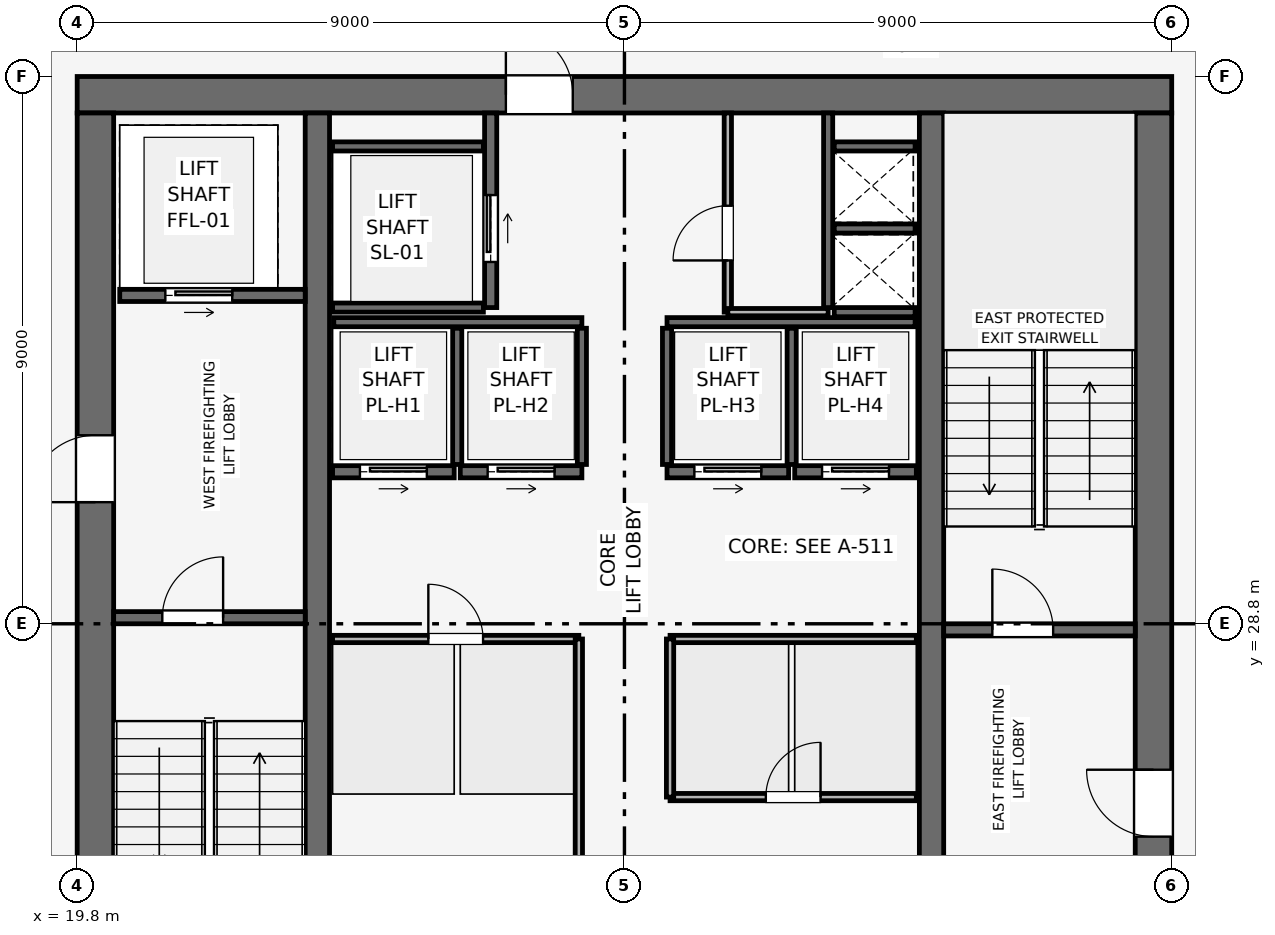
"""IFC4 building model, lengths in metres.
Left out: names, types, materials, properties, quantities, classifications, styles, units other than length and angle.
Written with IfcOpenShell. Run it as: python <this file> out.ifc"""

import sys

from ifc_helpers import new_model, si_unit, direction, frame, frame_2d, origin, place, context, subcontext, project, spatial, rectangle, extrude, element, fill, save


model = new_model("IFC4")
c1 = context("Model", 3, precision=1e-05, world=origin(), true_north=direction((0.0, 1.0)))
c2 = subcontext(c1, "Body", "Model", "MODEL_VIEW")
j1 = project(units=[si_unit("LENGTHUNIT", "METRE"), si_unit("PLANEANGLEUNIT", "RADIAN")], contexts=[c1])
p1 = place(None, origin())
s1 = spatial("IfcSite", under=j1, at=p1, CompositionType="ELEMENT")
p2 = place(p1, origin())
s2 = spatial("IfcBuilding", under=s1, at=p2, CompositionType="ELEMENT")
p3 = place(p2, frame((0.0, 0.0, 303.0)))
s3 = spatial("IfcBuildingStorey", under=s2, at=p3, CompositionType="ELEMENT", Elevation=303.0)
p4 = place(p3, frame((19.8, 37.5, 0.0), z_axis=(0.0, 0.0, 1.0), x_axis=(1.0, 0.0, 0.0)))
e1 = element("IfcWall", 1, at=p4, inside=s3, PredefinedType="SHEAR", context=c2, shape_type="SweptSolid", body=[
    extrude(rectangle(XDim=18.0, YDim=0.6, at=frame_2d((9.0, 0.0))), origin(), (0.0, 0.0, 1.0), 3.75),
])
p5 = place(p4, frame((7.05, 0.0, 0.0)))
e2 = element("IfcOpeningElement", 2, at=p5, cuts=e1, PredefinedType="OPENING", context=c2, shape_type="SweptSolid", body=[
    extrude(rectangle(XDim=1.1, YDim=2.15, at=frame_2d((0.55, 1.075))), frame((0.0, 0.31, 0.0), z_axis=(0.0, -1.0, 0.0), x_axis=(1.0, 0.0, 0.0)), (0.0, 0.0, 1.0), 0.62),
])
p6 = place(p3, frame((20.1, 20.4, 0.0), z_axis=(0.0, 0.0, 1.0), x_axis=(0.0, 1.0, 0.0)))
e3 = element("IfcWall", 3, at=p6, inside=s3, PredefinedType="SHEAR", context=c2, shape_type="SweptSolid", body=[
    extrude(rectangle(XDim=16.8, YDim=0.6, at=frame_2d((8.4, 0.0))), origin(), (0.0, 0.0, 1.0), 3.75),
])
p7 = place(p6, frame((10.4, 0.0, 0.0)))
e4 = element("IfcOpeningElement", 4, at=p7, cuts=e3, PredefinedType="OPENING", context=c2, shape_type="SweptSolid", body=[
    extrude(rectangle(XDim=1.1, YDim=2.15, at=frame_2d((0.55, 1.075))), frame((0.0, 0.31, 0.0), z_axis=(0.0, -1.0, 0.0), x_axis=(1.0, 0.0, 0.0)), (0.0, 0.0, 1.0), 0.62),
])
p8 = place(p3, frame((37.5, 20.4, 0.0), z_axis=(0.0, 0.0, 1.0), x_axis=(0.0, 1.0, 0.0)))
e5 = element("IfcWall", 5, at=p8, inside=s3, PredefinedType="SHEAR", context=c2, shape_type="SweptSolid", body=[
    extrude(rectangle(XDim=16.8, YDim=0.6, at=frame_2d((8.4, 0.0))), origin(), (0.0, 0.0, 1.0), 3.75),
])
p9 = place(p8, frame((4.9, 0.0, 0.0)))
e6 = element("IfcOpeningElement", 6, at=p9, cuts=e5, PredefinedType="OPENING", context=c2, shape_type="SweptSolid", body=[
    extrude(rectangle(XDim=1.1, YDim=2.15, at=frame_2d((0.55, 1.075))), frame((0.0, 0.31, 0.0), z_axis=(0.0, -1.0, 0.0), x_axis=(1.0, 0.0, 0.0)), (0.0, 0.0, 1.0), 0.62),
])
for number, where, z_axis, x_axis in (
    (7, (23.75, 20.4, 0.0), (0.0, 0.0, 1.0), (0.0, 1.0, 0.0)),
    (8, (33.85, 20.4, 0.0), (0.0, 0.0, 1.0), (0.0, 1.0, 0.0)),
):
    element("IfcWall", number, at=place(p3, frame(where, z_axis=z_axis, x_axis=x_axis)), inside=s3, PredefinedType="SHEAR", context=c2, shape_type="SweptSolid", body=[
        extrude(rectangle(XDim=16.8, YDim=0.4, at=frame_2d((8.4, 0.0))), origin(), (0.0, 0.0, 1.0), 3.75),
    ])
p10 = place(p3, frame((20.4, 28.9, 0.0), z_axis=(0.0, 0.0, 1.0), x_axis=(1.0, 0.0, 0.0)))
e9 = element("IfcWall", 9, at=p10, inside=s3, PredefinedType="SHEAR", context=c2, shape_type="SweptSolid", body=[
    extrude(rectangle(XDim=3.15, YDim=0.2, at=frame_2d((1.575, 0.0))), origin(), (0.0, 0.0, 1.0), 3.51),
])
p11 = place(p10, frame((0.8, 0.0, 0.0)))
e10 = element("IfcOpeningElement", 10, at=p11, cuts=e9, PredefinedType="OPENING", context=c2, shape_type="SweptSolid", body=[
    extrude(rectangle(XDim=1.0, YDim=2.1, at=frame_2d((0.5, 1.05))), frame((0.0, 0.11, 0.0), z_axis=(0.0, -1.0, 0.0), x_axis=(1.0, 0.0, 0.0)), (0.0, 0.0, 1.0), 0.22),
])
p12 = place(p3, frame((34.05, 28.7, 0.0), z_axis=(0.0, 0.0, 1.0), x_axis=(1.0, 0.0, 0.0)))
e11 = element("IfcWall", 11, at=p12, inside=s3, PredefinedType="SHEAR", context=c2, shape_type="SweptSolid", body=[
    extrude(rectangle(XDim=3.15, YDim=0.2, at=frame_2d((1.575, 0.0))), origin(), (0.0, 0.0, 1.0), 3.51),
])
p13 = place(p12, frame((0.8, 0.0, 0.0)))
e12 = element("IfcOpeningElement", 12, at=p13, cuts=e11, PredefinedType="OPENING", context=c2, shape_type="SweptSolid", body=[
    extrude(rectangle(XDim=1.0, YDim=2.1, at=frame_2d((0.5, 1.05))), frame((0.0, 0.11, 0.0), z_axis=(0.0, -1.0, 0.0), x_axis=(1.0, 0.0, 0.0)), (0.0, 0.0, 1.0), 0.22),
])
p14 = place(p3, frame((32.15, 34.0, 0.0), z_axis=(0.0, 0.0, 1.0), x_axis=(0.0, 1.0, 0.0)))
e13 = element("IfcWall", 13, at=p14, inside=s3, PredefinedType="SHEAR", context=c2, shape_type="SweptSolid", body=[
    extrude(rectangle(XDim=3.2, YDim=0.15, at=frame_2d((1.6, 0.0))), origin(), (0.0, 0.0, 1.0), 3.51),
])
for number, where, z_axis, x_axis in (
    (14, (32.25, 33.925, 0.0), (0.0, 0.0, 1.0), (1.0, 0.0, 0.0)),
    (15, (32.25, 35.3, 0.0), (0.0, 0.0, 1.0), (1.0, 0.0, 0.0)),
):
    element("IfcWall", number, at=place(p3, frame(where, z_axis=z_axis, x_axis=x_axis)), inside=s3, PredefinedType="SHEAR", context=c2, shape_type="SweptSolid", body=[
        extrude(rectangle(XDim=1.33, YDim=0.15, at=frame_2d((0.665, 0.0))), origin(), (0.0, 0.0, 1.0), 3.51),
    ])
p15 = place(p3, frame((20.5, 34.2, 0.0), z_axis=(0.0, 0.0, 1.0), x_axis=(1.0, 0.0, 0.0)))
e16 = element("IfcWall", 16, at=p15, inside=s3, PredefinedType="SHEAR", context=c2, shape_type="SweptSolid", body=[
    extrude(rectangle(XDim=3.05, YDim=0.2, at=frame_2d((1.525, 0.0))), origin(), (0.0, 0.0, 1.0), 3.51),
])
p16 = place(p15, frame((0.75, 0.0, 0.0)))
e17 = element("IfcOpeningElement", 17, at=p16, cuts=e16, PredefinedType="OPENING", context=c2, shape_type="SweptSolid", body=[
    extrude(rectangle(XDim=1.1, YDim=2.15, at=frame_2d((0.55, 1.075))), frame((0.0, 0.11, 0.0), z_axis=(0.0, -1.0, 0.0), x_axis=(1.0, 0.0, 0.0)), (0.0, 0.0, 1.0), 0.22),
])
p17 = place(p3, frame((26.6, 34.0, 0.0), z_axis=(0.0, 0.0, 1.0), x_axis=(0.0, 1.0, 0.0)))
e18 = element("IfcWall", 18, at=p17, inside=s3, PredefinedType="SHEAR", context=c2, shape_type="SweptSolid", body=[
    extrude(rectangle(XDim=3.2, YDim=0.2, at=frame_2d((1.6, 0.0))), origin(), (0.0, 0.0, 1.0), 3.51),
])
p18 = place(p17, frame((0.75, 0.0, 0.0)))
e19 = element("IfcOpeningElement", 19, at=p18, cuts=e18, PredefinedType="OPENING", context=c2, shape_type="SweptSolid", body=[
    extrude(rectangle(XDim=1.1, YDim=2.15, at=frame_2d((0.55, 1.075))), frame((0.0, 0.11, 0.0), z_axis=(0.0, -1.0, 0.0), x_axis=(1.0, 0.0, 0.0)), (0.0, 0.0, 1.0), 0.22),
])
for number, where, z_axis, x_axis in (
    (20, (24.0, 34.0, 0.0), (0.0, 0.0, 1.0), (1.0, 0.0, 0.0)),
    (21, (24.0, 36.65, 0.0), (0.0, 0.0, 1.0), (1.0, 0.0, 0.0)),
):
    element("IfcWall", number, at=place(p3, frame(where, z_axis=z_axis, x_axis=x_axis)), inside=s3, PredefinedType="SHEAR", context=c2, shape_type="SweptSolid", body=[
        extrude(rectangle(XDim=2.48, YDim=0.15, at=frame_2d((1.24, 0.0))), origin(), (0.0, 0.0, 1.0), 3.51),
    ])
p19 = place(p3, frame((24.0, 31.3, 0.0), z_axis=(0.0, 0.0, 1.0), x_axis=(1.0, 0.0, 0.0)))
e22 = element("IfcWall", 22, at=p19, inside=s3, PredefinedType="SHEAR", context=c2, shape_type="SweptSolid", body=[
    extrude(rectangle(XDim=2.0, YDim=0.2, at=frame_2d((1.0, 0.0))), origin(), (0.0, 0.0, 1.0), 3.51),
])
p20 = place(p19, frame((0.45, 0.0, 0.0)))
e23 = element("IfcOpeningElement", 23, at=p20, cuts=e22, PredefinedType="OPENING", context=c2, shape_type="SweptSolid", body=[
    extrude(rectangle(XDim=1.1, YDim=2.15, at=frame_2d((0.55, 1.075))), frame((0.0, 0.11, 0.0), z_axis=(0.0, -1.0, 0.0), x_axis=(1.0, 0.0, 0.0)), (0.0, 0.0, 1.0), 0.22),
])
p21 = place(p3, frame((26.1, 31.3, 0.0), z_axis=(0.0, 0.0, 1.0), x_axis=(1.0, 0.0, 0.0)))
e24 = element("IfcWall", 24, at=p21, inside=s3, PredefinedType="SHEAR", context=c2, shape_type="SweptSolid", body=[
    extrude(rectangle(XDim=2.0, YDim=0.2, at=frame_2d((1.0, 0.0))), origin(), (0.0, 0.0, 1.0), 3.51),
])
p22 = place(p21, frame((0.45, 0.0, 0.0)))
e25 = element("IfcOpeningElement", 25, at=p22, cuts=e24, PredefinedType="OPENING", context=c2, shape_type="SweptSolid", body=[
    extrude(rectangle(XDim=1.1, YDim=2.15, at=frame_2d((0.55, 1.075))), frame((0.0, 0.11, 0.0), z_axis=(0.0, -1.0, 0.0), x_axis=(1.0, 0.0, 0.0)), (0.0, 0.0, 1.0), 0.22),
])
p23 = place(p3, frame((29.5, 31.3, 0.0), z_axis=(0.0, 0.0, 1.0), x_axis=(1.0, 0.0, 0.0)))
e26 = element("IfcWall", 26, at=p23, inside=s3, PredefinedType="SHEAR", context=c2, shape_type="SweptSolid", body=[
    extrude(rectangle(XDim=2.0, YDim=0.2, at=frame_2d((1.0, 0.0))), origin(), (0.0, 0.0, 1.0), 3.51),
])
p24 = place(p23, frame((0.45, 0.0, 0.0)))
e27 = element("IfcOpeningElement", 27, at=p24, cuts=e26, PredefinedType="OPENING", context=c2, shape_type="SweptSolid", body=[
    extrude(rectangle(XDim=1.1, YDim=2.15, at=frame_2d((0.55, 1.075))), frame((0.0, 0.11, 0.0), z_axis=(0.0, -1.0, 0.0), x_axis=(1.0, 0.0, 0.0)), (0.0, 0.0, 1.0), 0.22),
])
p25 = place(p3, frame((31.6, 31.3, 0.0), z_axis=(0.0, 0.0, 1.0), x_axis=(1.0, 0.0, 0.0)))
e28 = element("IfcWall", 28, at=p25, inside=s3, PredefinedType="SHEAR", context=c2, shape_type="SweptSolid", body=[
    extrude(rectangle(XDim=2.0, YDim=0.2, at=frame_2d((1.0, 0.0))), origin(), (0.0, 0.0, 1.0), 3.51),
])
p26 = place(p25, frame((0.45, 0.0, 0.0)))
e29 = element("IfcOpeningElement", 29, at=p26, cuts=e28, PredefinedType="OPENING", context=c2, shape_type="SweptSolid", body=[
    extrude(rectangle(XDim=1.1, YDim=2.15, at=frame_2d((0.55, 1.075))), frame((0.0, 0.11, 0.0), z_axis=(0.0, -1.0, 0.0), x_axis=(1.0, 0.0, 0.0)), (0.0, 0.0, 1.0), 0.22),
])
p27 = place(p3, frame((32.25, 36.65, 0.0), z_axis=(0.0, 0.0, 1.0), x_axis=(1.0, 0.0, 0.0)))
e30 = element("IfcWall", 30, at=p27, inside=s3, PredefinedType="SHEAR", context=c2, shape_type="SweptSolid", body=[
    extrude(rectangle(XDim=1.33, YDim=0.15, at=frame_2d((0.665, 0.0))), origin(), (0.0, 0.0, 1.0), 3.51),
])
for number, where, z_axis, x_axis in (
    (31, (24.02, 33.76, 0.0), (0.0, 0.0, 1.0), (1.0, 0.0, 0.0)),
    (32, (29.5, 33.76, 0.0), (0.0, 0.0, 1.0), (1.0, 0.0, 0.0)),
):
    element("IfcWall", number, at=place(p3, frame(where, z_axis=z_axis, x_axis=x_axis)), inside=s3, PredefinedType="SHEAR", context=c2, shape_type="SweptSolid", body=[
        extrude(rectangle(XDim=4.08, YDim=0.15, at=frame_2d((2.04, 0.0))), origin(), (0.0, 0.0, 1.0), 3.51),
    ])
for number, where, z_axis, x_axis in (
    (33, (26.05, 31.42, 0.0), (0.0, 0.0, 1.0), (0.0, 1.0, 0.0)),
    (34, (28.1, 31.42, 0.0), (0.0, 0.0, 1.0), (0.0, 1.0, 0.0)),
    (35, (29.5, 31.42, 0.0), (0.0, 0.0, 1.0), (0.0, 1.0, 0.0)),
    (36, (31.55, 31.42, 0.0), (0.0, 0.0, 1.0), (0.0, 1.0, 0.0)),
):
    element("IfcWall", number, at=place(p3, frame(where, z_axis=z_axis, x_axis=x_axis)), inside=s3, PredefinedType="SHEAR", context=c2, shape_type="SweptSolid", body=[
        extrude(rectangle(XDim=2.24, YDim=0.15, at=frame_2d((1.12, 0.0))), origin(), (0.0, 0.0, 1.0), 3.51),
    ])
p28 = place(p3, frame((30.5, 33.925, 0.0), z_axis=(0.0, 0.0, 1.0), x_axis=(0.0, 1.0, 0.0)))
e37 = element("IfcWall", 37, at=p28, inside=s3, PredefinedType="PARTITIONING", context=c2, shape_type="SweptSolid", body=[
    extrude(rectangle(XDim=3.275, YDim=0.12, at=frame_2d((1.637, 0.0))), origin(), (0.0, 0.0, 1.0), 3.51),
])
p29 = place(p28, frame((0.85, 0.0, 0.0)))
e38 = element("IfcOpeningElement", 38, at=p29, cuts=e37, PredefinedType="OPENING", context=c2, shape_type="SweptSolid", body=[
    extrude(rectangle(XDim=0.9, YDim=2.1, at=frame_2d((0.45, 1.05))), frame((0.0, 0.07, 0.0), z_axis=(0.0, -1.0, 0.0), x_axis=(1.0, 0.0, 0.0)), (0.0, 0.0, 1.0), 0.14),
])
p30 = place(p3, frame((30.5, 33.925, 0.0), z_axis=(0.0, 0.0, 1.0), x_axis=(1.0, 0.0, 0.0)))
e39 = element("IfcWall", 39, at=p30, inside=s3, PredefinedType="PARTITIONING", context=c2, shape_type="SweptSolid", body=[
    extrude(rectangle(XDim=1.65, YDim=0.12, at=frame_2d((0.825, 0.0))), origin(), (0.0, 0.0, 1.0), 3.51),
])
p31 = place(p3, frame((24.0, 28.55, 0.0), z_axis=(0.0, 0.0, 1.0), x_axis=(1.0, 0.0, 0.0)))
e40 = element("IfcWall", 40, at=p31, inside=s3, PredefinedType="PARTITIONING", context=c2, shape_type="SweptSolid", body=[
    extrude(rectangle(XDim=4.05, YDim=0.12, at=frame_2d((2.025, 0.0))), origin(), (0.0, 0.0, 1.0), 3.51),
])
p32 = place(p31, frame((1.575, 0.0, 0.0)))
e41 = element("IfcOpeningElement", 41, at=p32, cuts=e40, PredefinedType="OPENING", context=c2, shape_type="SweptSolid", body=[
    extrude(rectangle(XDim=0.9, YDim=2.1, at=frame_2d((0.45, 1.05))), frame((0.0, 0.07, 0.0), z_axis=(0.0, -1.0, 0.0), x_axis=(1.0, 0.0, 0.0)), (0.0, 0.0, 1.0), 0.14),
])
p33 = place(p3, frame((28.05, 20.4, 0.0), z_axis=(0.0, 0.0, 1.0), x_axis=(0.0, 1.0, 0.0)))
e42 = element("IfcWall", 42, at=p33, inside=s3, PredefinedType="PARTITIONING", context=c2, shape_type="SweptSolid", body=[
    extrude(rectangle(XDim=8.15, YDim=0.12, at=frame_2d((4.075, 0.0))), origin(), (0.0, 0.0, 1.0), 3.51),
])
p34 = place(p3, frame((29.55, 25.95, 0.0), z_axis=(0.0, 0.0, 1.0), x_axis=(1.0, 0.0, 0.0)))
e43 = element("IfcWall", 43, at=p34, inside=s3, PredefinedType="PARTITIONING", context=c2, shape_type="SweptSolid", body=[
    extrude(rectangle(XDim=4.05, YDim=0.12, at=frame_2d((2.025, 0.0))), origin(), (0.0, 0.0, 1.0), 3.51),
])
p35 = place(p34, frame((1.575, 0.0, 0.0)))
e44 = element("IfcOpeningElement", 44, at=p35, cuts=e43, PredefinedType="OPENING", context=c2, shape_type="SweptSolid", body=[
    extrude(rectangle(XDim=0.9, YDim=2.1, at=frame_2d((0.45, 1.05))), frame((0.0, 0.07, 0.0), z_axis=(0.0, -1.0, 0.0), x_axis=(1.0, 0.0, 0.0)), (0.0, 0.0, 1.0), 0.14),
])
p36 = place(p3, frame((29.55, 28.55, 0.0), z_axis=(0.0, 0.0, 1.0), x_axis=(1.0, 0.0, 0.0)))
e45 = element("IfcWall", 45, at=p36, inside=s3, PredefinedType="PARTITIONING", context=c2, shape_type="SweptSolid", body=[
    extrude(rectangle(XDim=4.05, YDim=0.12, at=frame_2d((2.025, 0.0))), origin(), (0.0, 0.0, 1.0), 3.51),
])
p37 = place(p3, frame((29.55, 25.95, 0.0), z_axis=(0.0, 0.0, 1.0), x_axis=(0.0, 1.0, 0.0)))
e46 = element("IfcWall", 46, at=p37, inside=s3, PredefinedType="PARTITIONING", context=c2, shape_type="SweptSolid", body=[
    extrude(rectangle(XDim=2.6, YDim=0.12, at=frame_2d((1.3, 0.0))), origin(), (0.0, 0.0, 1.0), 3.51),
])
p38 = place(p11, origin())
e47 = element("IfcDoor", 47, at=p38, inside=s3, OperationType="SINGLE_SWING_RIGHT", PredefinedType="DOOR", context=c2, shape_type="SweptSolid", body=[
    extrude(rectangle(XDim=1.0, YDim=2.1, at=frame_2d((0.5, 1.05))), frame((0.0, 0.025, 0.0), z_axis=(0.0, -1.0, 0.0), x_axis=(1.0, 0.0, 0.0)), (0.0, 0.0, 1.0), 0.05),
])
fill(e10, e47)
p39 = place(p13, origin())
e48 = element("IfcDoor", 48, at=p39, inside=s3, OperationType="SINGLE_SWING_LEFT", PredefinedType="DOOR", context=c2, shape_type="SweptSolid", body=[
    extrude(rectangle(XDim=1.0, YDim=2.1, at=frame_2d((0.5, 1.05))), frame((0.0, 0.025, 0.0), z_axis=(0.0, -1.0, 0.0), x_axis=(1.0, 0.0, 0.0)), (0.0, 0.0, 1.0), 0.05),
])
fill(e12, e48)
p40 = place(p16, origin())
e49 = element("IfcDoor", 49, at=p40, inside=s3, OperationType="SLIDING_TO_RIGHT", PredefinedType="DOOR", context=c2, shape_type="SweptSolid", body=[
    extrude(rectangle(XDim=1.1, YDim=2.15, at=frame_2d((0.55, 1.075))), frame((0.0, 0.025, 0.0), z_axis=(0.0, -1.0, 0.0), x_axis=(1.0, 0.0, 0.0)), (0.0, 0.0, 1.0), 0.05),
])
fill(e17, e49)
p41 = place(p18, origin())
e50 = element("IfcDoor", 50, at=p41, inside=s3, OperationType="SLIDING_TO_RIGHT", PredefinedType="DOOR", context=c2, shape_type="SweptSolid", body=[
    extrude(rectangle(XDim=1.1, YDim=2.15, at=frame_2d((0.55, 1.075))), frame((0.0, 0.025, 0.0), z_axis=(0.0, -1.0, 0.0), x_axis=(1.0, 0.0, 0.0)), (0.0, 0.0, 1.0), 0.05),
])
fill(e19, e50)
p42 = place(p20, origin())
e51 = element("IfcDoor", 51, at=p42, inside=s3, OperationType="SLIDING_TO_RIGHT", PredefinedType="DOOR", context=c2, shape_type="SweptSolid", body=[
    extrude(rectangle(XDim=1.1, YDim=2.15, at=frame_2d((0.55, 1.075))), frame((0.0, 0.025, 0.0), z_axis=(0.0, -1.0, 0.0), x_axis=(1.0, 0.0, 0.0)), (0.0, 0.0, 1.0), 0.05),
])
fill(e23, e51)
p43 = place(p22, origin())
e52 = element("IfcDoor", 52, at=p43, inside=s3, OperationType="SLIDING_TO_RIGHT", PredefinedType="DOOR", context=c2, shape_type="SweptSolid", body=[
    extrude(rectangle(XDim=1.1, YDim=2.15, at=frame_2d((0.55, 1.075))), frame((0.0, 0.025, 0.0), z_axis=(0.0, -1.0, 0.0), x_axis=(1.0, 0.0, 0.0)), (0.0, 0.0, 1.0), 0.05),
])
fill(e25, e52)
p44 = place(p24, origin())
e53 = element("IfcDoor", 53, at=p44, inside=s3, OperationType="SLIDING_TO_RIGHT", PredefinedType="DOOR", context=c2, shape_type="SweptSolid", body=[
    extrude(rectangle(XDim=1.1, YDim=2.15, at=frame_2d((0.55, 1.075))), frame((0.0, 0.025, 0.0), z_axis=(0.0, -1.0, 0.0), x_axis=(1.0, 0.0, 0.0)), (0.0, 0.0, 1.0), 0.05),
])
fill(e27, e53)
p45 = place(p26, origin())
e54 = element("IfcDoor", 54, at=p45, inside=s3, OperationType="SLIDING_TO_RIGHT", PredefinedType="DOOR", context=c2, shape_type="SweptSolid", body=[
    extrude(rectangle(XDim=1.1, YDim=2.15, at=frame_2d((0.55, 1.075))), frame((0.0, 0.025, 0.0), z_axis=(0.0, -1.0, 0.0), x_axis=(1.0, 0.0, 0.0)), (0.0, 0.0, 1.0), 0.05),
])
fill(e29, e54)
p46 = place(p29, origin())
e55 = element("IfcDoor", 55, at=p46, inside=s3, OperationType="SINGLE_SWING_LEFT", PredefinedType="DOOR", context=c2, shape_type="SweptSolid", body=[
    extrude(rectangle(XDim=0.9, YDim=2.1, at=frame_2d((0.45, 1.05))), frame((0.0, 0.025, 0.0), z_axis=(0.0, -1.0, 0.0), x_axis=(1.0, 0.0, 0.0)), (0.0, 0.0, 1.0), 0.05),
])
fill(e38, e55)
p47 = place(p32, origin())
e56 = element("IfcDoor", 56, at=p47, inside=s3, OperationType="SINGLE_SWING_LEFT", PredefinedType="DOOR", context=c2, shape_type="SweptSolid", body=[
    extrude(rectangle(XDim=0.9, YDim=2.1, at=frame_2d((0.45, 1.05))), frame((0.0, 0.025, 0.0), z_axis=(0.0, -1.0, 0.0), x_axis=(1.0, 0.0, 0.0)), (0.0, 0.0, 1.0), 0.05),
])
fill(e41, e56)
p48 = place(p35, origin())
e57 = element("IfcDoor", 57, at=p48, inside=s3, OperationType="SINGLE_SWING_RIGHT", PredefinedType="DOOR", context=c2, shape_type="SweptSolid", body=[
    extrude(rectangle(XDim=0.9, YDim=2.1, at=frame_2d((0.45, 1.05))), frame((0.0, 0.025, 0.0), z_axis=(0.0, -1.0, 0.0), x_axis=(1.0, 0.0, 0.0)), (0.0, 0.0, 1.0), 0.05),
])
fill(e44, e57)
p49 = place(p7, origin())
e58 = element("IfcDoor", 58, at=p49, inside=s3, OperationType="SINGLE_SWING_LEFT", PredefinedType="DOOR", context=c2, shape_type="SweptSolid", body=[
    extrude(rectangle(XDim=1.1, YDim=2.15, at=frame_2d((0.55, 1.075))), frame((0.0, 0.025, 0.0), z_axis=(0.0, -1.0, 0.0), x_axis=(1.0, 0.0, 0.0)), (0.0, 0.0, 1.0), 0.05),
])
fill(e4, e58)
p50 = place(p9, origin())
e59 = element("IfcDoor", 59, at=p50, inside=s3, OperationType="SINGLE_SWING_RIGHT", PredefinedType="DOOR", context=c2, shape_type="SweptSolid", body=[
    extrude(rectangle(XDim=1.1, YDim=2.15, at=frame_2d((0.55, 1.075))), frame((0.0, 0.025, 0.0), z_axis=(0.0, -1.0, 0.0), x_axis=(1.0, 0.0, 0.0)), (0.0, 0.0, 1.0), 0.05),
])
fill(e6, e59)
p51 = place(p5, origin())
e60 = element("IfcDoor", 60, at=p51, inside=s3, OperationType="SINGLE_SWING_LEFT", PredefinedType="DOOR", context=c2, shape_type="SweptSolid", body=[
    extrude(rectangle(XDim=1.1, YDim=2.15, at=frame_2d((0.55, 1.075))), frame((0.0, 0.025, 0.0), z_axis=(0.0, -1.0, 0.0), x_axis=(1.0, 0.0, 0.0)), (0.0, 0.0, 1.0), 0.05),
])
fill(e2, e60)
save(model, sys.argv[1])
